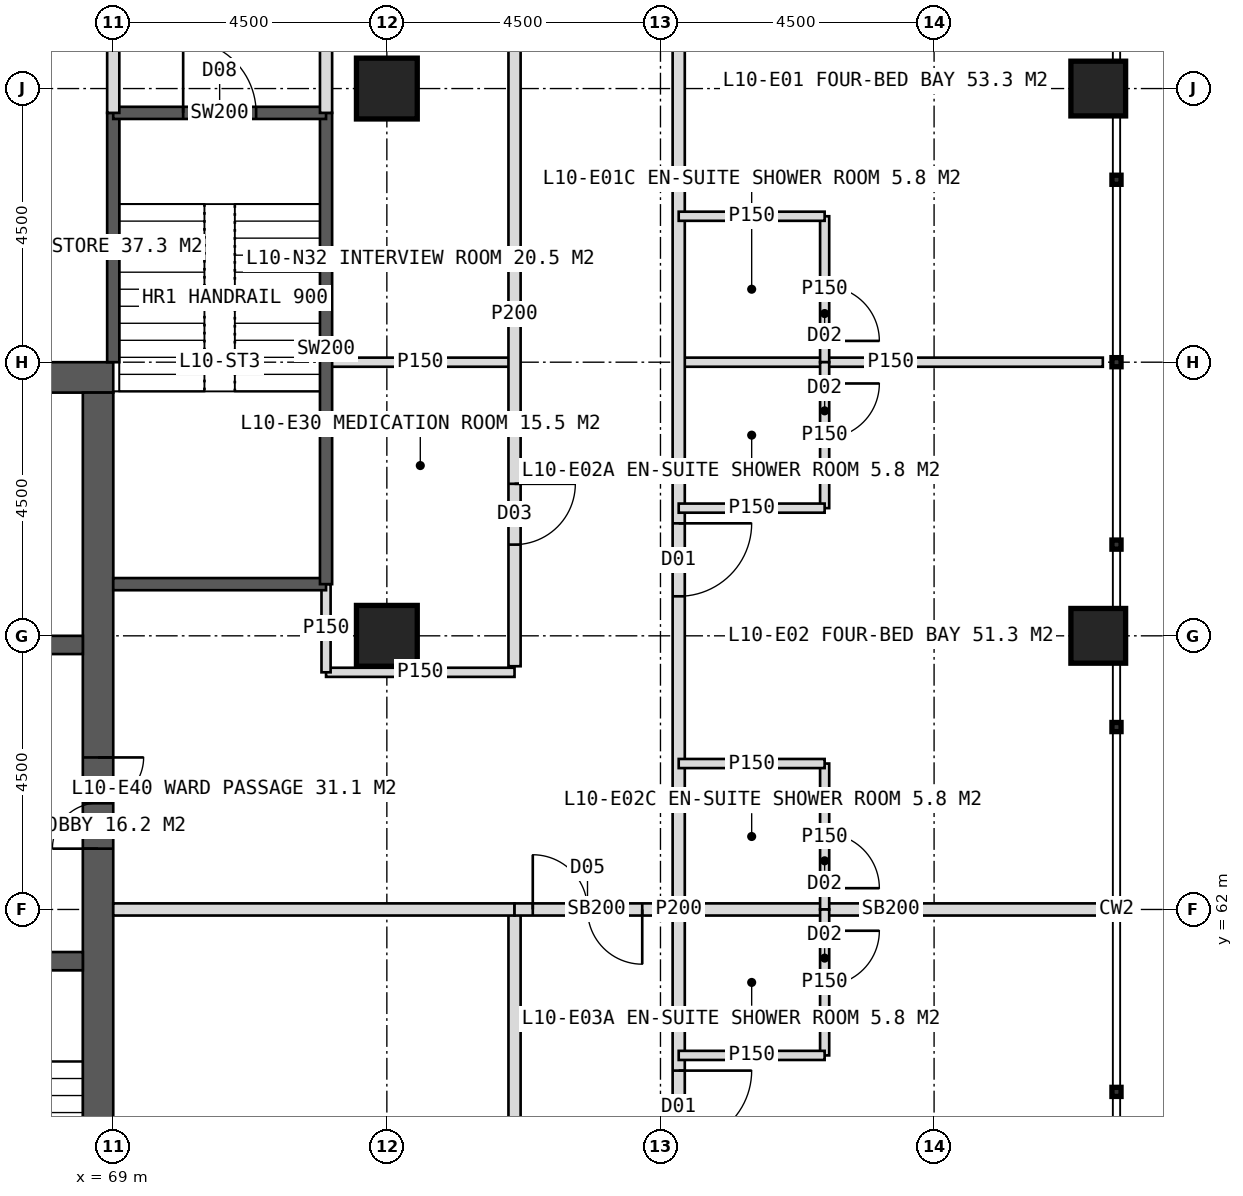
"""IFC4 building model, lengths in metres.
Left out: names, types, materials, properties, quantities, classifications, styles, units other than length and angle.
Written with IfcOpenShell. Run it as: python <this file> out.ifc"""

import sys

from ifc_helpers import new_model, si_unit, direction, frame, frame_2d, origin, origin_2d, place, context, subcontext, project, spatial, rectangle, hollow_rectangle, extrude, element, fill, save


model = new_model("IFC4")
c1 = context("Model", 3, precision=1e-05, world=origin(), true_north=direction((0.0, 1.0)))
c2 = subcontext(c1, "Body", "Model", "MODEL_VIEW")
j1 = project(units=[si_unit("LENGTHUNIT", "METRE"), si_unit("PLANEANGLEUNIT", "RADIAN")], contexts=[c1])
p1 = place(None, origin())
s1 = spatial("IfcSite", under=j1, at=p1, CompositionType="ELEMENT")
p2 = place(p1, origin())
s2 = spatial("IfcBuilding", under=s1, at=p2, CompositionType="ELEMENT")
p3 = place(p2, frame((0.0, 0.0, 47.0)))
s3 = spatial("IfcBuildingStorey", under=s2, at=p3, CompositionType="ELEMENT", Elevation=47.0)
p4 = place(p3, frame((51.0, 70.75, 0.0), z_axis=(0.0, 0.0, 1.0), x_axis=(1.0, 0.0, 0.0)))
e1 = element("IfcWall", 1, at=p4, inside=s3, PredefinedType="SHEAR", context=c2, shape_type="SweptSolid", body=[
    extrude(rectangle(XDim=18.0, YDim=0.5, at=frame_2d((9.0, 0.0))), origin(), (0.0, 0.0, 1.0), 4.0),
])
p5 = place(p4, frame((8.1, 0.0, 0.0)))
e2 = element("IfcOpeningElement", 2, at=p5, cuts=e1, PredefinedType="OPENING", context=c2, shape_type="SweptSolid", body=[
    extrude(rectangle(XDim=1.8, YDim=2.2, at=frame_2d((0.9, 1.1))), frame((0.0, 0.26, 0.0), z_axis=(0.0, -1.0, 0.0), x_axis=(1.0, 0.0, 0.0)), (0.0, 0.0, 1.0), 0.52),
])
p6 = place(p3, frame((68.75, 53.5, 0.0), z_axis=(0.0, 0.0, 1.0), x_axis=(0.0, 1.0, 0.0)))
e3 = element("IfcWall", 3, at=p6, inside=s3, PredefinedType="SHEAR", context=c2, shape_type="SweptSolid", body=[
    extrude(rectangle(XDim=17.0, YDim=0.5, at=frame_2d((8.5, 0.0))), origin(), (0.0, 0.0, 1.0), 4.0),
])
p7 = place(p6, frame((9.5, 0.0, 0.0)))
e4 = element("IfcOpeningElement", 4, at=p7, cuts=e3, PredefinedType="OPENING", context=c2, shape_type="SweptSolid", body=[
    extrude(rectangle(XDim=1.5, YDim=2.2, at=frame_2d((0.75, 1.1))), frame((0.0, 0.26, 0.0), z_axis=(0.0, -1.0, 0.0), x_axis=(1.0, 0.0, 0.0)), (0.0, 0.0, 1.0), 0.52),
])
p8 = place(p3, frame((65.2, 61.15, 0.0), z_axis=(0.0, 0.0, 1.0), x_axis=(1.0, 0.0, 0.0)))
e5 = element("IfcWall", 5, at=p8, inside=s3, PredefinedType="SHEAR", context=c2, shape_type="SweptSolid", body=[
    extrude(rectangle(XDim=3.3, YDim=0.3, at=frame_2d((1.65, 0.0))), origin(), (0.0, 0.0, 1.0), 4.0),
])
p9 = place(p8, frame((1.05, 0.0, 0.0)))
e6 = element("IfcOpeningElement", 6, at=p9, cuts=e5, PredefinedType="OPENING", context=c2, shape_type="SweptSolid", body=[
    extrude(rectangle(XDim=1.2, YDim=2.1, at=frame_2d((0.6, 1.05))), frame((0.0, 0.16, 0.0), z_axis=(0.0, -1.0, 0.0), x_axis=(1.0, 0.0, 0.0)), (0.0, 0.0, 1.0), 0.32),
])
p10 = place(p3, frame((65.2, 66.35, 0.0), z_axis=(0.0, 0.0, 1.0), x_axis=(1.0, 0.0, 0.0)))
e7 = element("IfcWall", 7, at=p10, inside=s3, PredefinedType="SHEAR", context=c2, shape_type="SweptSolid", body=[
    extrude(rectangle(XDim=3.3, YDim=0.3, at=frame_2d((1.65, 0.0))), origin(), (0.0, 0.0, 1.0), 4.0),
])
p11 = place(p10, frame((1.05, 0.0, 0.0)))
e8 = element("IfcOpeningElement", 8, at=p11, cuts=e7, PredefinedType="OPENING", context=c2, shape_type="SweptSolid", body=[
    extrude(rectangle(XDim=1.2, YDim=2.2, at=frame_2d((0.6, 1.1))), frame((0.0, 0.16, 0.0), z_axis=(0.0, -1.0, 0.0), x_axis=(1.0, 0.0, 0.0)), (0.0, 0.0, 1.0), 0.32),
])
for number, where, z_axis, x_axis in (
    (9, (73.5, 75.5, 0.0), (0.0, 0.0, 1.0), (1.0, 0.0, 0.0)),
    (10, (73.5, 66.5, 0.0), (0.0, 0.0, 1.0), (1.0, 0.0, 0.0)),
):
    element("IfcColumn", number, at=place(p3, frame(where, z_axis=z_axis, x_axis=x_axis)), inside=s3, PredefinedType="COLUMN", context=c2, shape_type="SweptSolid", body=[
        extrude(hollow_rectangle(XDim=1.0, YDim=1.0, WallThickness=0.1, at=origin_2d()), origin(), (0.0, 0.0, 1.0), 4.0),
    ])
for number, where, z_axis, x_axis in (
    (11, (85.2, 66.5, 0.0), (0.0, 0.0, 1.0), (1.0, 0.0, 0.0)),
    (12, (85.2, 75.5, 0.0), (0.0, 0.0, 1.0), (1.0, 0.0, 0.0)),
):
    element("IfcColumn", number, at=place(p3, frame(where, z_axis=z_axis, x_axis=x_axis)), inside=s3, PredefinedType="COLUMN", context=c2, shape_type="SweptSolid", body=[
        extrude(hollow_rectangle(XDim=0.9, YDim=0.9, WallThickness=0.08, at=origin_2d()), origin(), (0.0, 0.0, 1.0), 4.0),
    ])
p12 = place(p3, frame((78.3, 71.0, 0.0), z_axis=(0.0, 0.0, 1.0), x_axis=(1.0, 0.0, 0.0)))
e13 = element("IfcWall", 13, at=p12, inside=s3, PredefinedType="PARTITIONING", context=c2, shape_type="SweptSolid", body=[
    extrude(rectangle(XDim=6.975, YDim=0.15, at=frame_2d((3.487, 0.0))), origin(), (0.0, 0.0, 1.0), 3.75),
])
p13 = place(p3, frame((78.3, 62.0, 0.0), z_axis=(0.0, 0.0, 1.0), x_axis=(1.0, 0.0, 0.0)))
e14 = element("IfcWall", 14, at=p13, inside=s3, PredefinedType="SOLIDWALL", context=c2, shape_type="SweptSolid", body=[
    extrude(rectangle(XDim=6.975, YDim=0.2, at=frame_2d((3.487, 0.0))), origin(), (0.0, 0.0, 1.0), 2.75),
])
p14 = place(p3, frame((78.3, 80.3, 0.0), z_axis=(0.0, 0.0, 1.0), x_axis=(0.0, -1.0, 0.0)))
e15 = element("IfcWall", 15, at=p14, inside=s3, PredefinedType="PARTITIONING", context=c2, shape_type="SweptSolid", body=[
    extrude(rectangle(XDim=36.6, YDim=0.2, at=frame_2d((18.3, 0.0))), origin(), (0.0, 0.0, 1.0), 3.75),
])
p15 = place(p14, frame((2.65, 0.0, 0.0)))
e16 = element("IfcOpeningElement", 16, at=p15, cuts=e15, PredefinedType="OPENING", context=c2, shape_type="SweptSolid", body=[
    extrude(rectangle(XDim=1.2, YDim=2.2, at=frame_2d((0.6, 1.1))), frame((0.0, 0.11, 0.0), z_axis=(0.0, -1.0, 0.0), x_axis=(1.0, 0.0, 0.0)), (0.0, 0.0, 1.0), 0.22),
])
p16 = place(p14, frame((11.95, 0.0, 0.0)))
e17 = element("IfcOpeningElement", 17, at=p16, cuts=e15, PredefinedType="OPENING", context=c2, shape_type="SweptSolid", body=[
    extrude(rectangle(XDim=1.2, YDim=2.2, at=frame_2d((0.6, 1.1))), frame((0.0, 0.11, 0.0), z_axis=(0.0, -1.0, 0.0), x_axis=(1.0, 0.0, 0.0)), (0.0, 0.0, 1.0), 0.22),
])
p17 = place(p14, frame((20.95, 0.0, 0.0)))
e18 = element("IfcOpeningElement", 18, at=p17, cuts=e15, PredefinedType="OPENING", context=c2, shape_type="SweptSolid", body=[
    extrude(rectangle(XDim=1.2, YDim=2.2, at=frame_2d((0.6, 1.1))), frame((0.0, 0.11, 0.0), z_axis=(0.0, -1.0, 0.0), x_axis=(1.0, 0.0, 0.0)), (0.0, 0.0, 1.0), 0.22),
])
p18 = place(p14, frame((29.95, 0.0, 0.0)))
e19 = element("IfcOpeningElement", 19, at=p18, cuts=e15, PredefinedType="OPENING", context=c2, shape_type="SweptSolid", body=[
    extrude(rectangle(XDim=1.2, YDim=2.2, at=frame_2d((0.6, 1.1))), frame((0.0, 0.11, 0.0), z_axis=(0.0, -1.0, 0.0), x_axis=(1.0, 0.0, 0.0)), (0.0, 0.0, 1.0), 0.22),
])
p19 = place(p3, frame((80.7, 73.4, 0.0), z_axis=(0.0, 0.0, 1.0), x_axis=(0.0, -1.0, 0.0)))
e20 = element("IfcWall", 20, at=p19, inside=s3, PredefinedType="PARTITIONING", context=c2, shape_type="SweptSolid", body=[
    extrude(rectangle(XDim=2.4, YDim=0.15, at=frame_2d((1.2, 0.0))), origin(), (0.0, 0.0, 1.0), 3.75),
])
p20 = place(p19, frame((1.15, 0.0, 0.0)))
e21 = element("IfcOpeningElement", 21, at=p20, cuts=e20, PredefinedType="OPENING", context=c2, shape_type="SweptSolid", body=[
    extrude(rectangle(XDim=0.9, YDim=2.1, at=frame_2d((0.45, 1.05))), frame((0.0, 0.085, 0.0), z_axis=(0.0, -1.0, 0.0), x_axis=(1.0, 0.0, 0.0)), (0.0, 0.0, 1.0), 0.17),
])
p21 = place(p3, frame((78.3, 73.4, 0.0), z_axis=(0.0, 0.0, 1.0), x_axis=(1.0, 0.0, 0.0)))
e22 = element("IfcWall", 22, at=p21, inside=s3, PredefinedType="PARTITIONING", context=c2, shape_type="SweptSolid", body=[
    extrude(rectangle(XDim=2.4, YDim=0.15, at=frame_2d((1.2, 0.0))), origin(), (0.0, 0.0, 1.0), 3.75),
])
p22 = place(p3, frame((80.7, 71.0, 0.0), z_axis=(0.0, 0.0, 1.0), x_axis=(0.0, -1.0, 0.0)))
e23 = element("IfcWall", 23, at=p22, inside=s3, PredefinedType="PARTITIONING", context=c2, shape_type="SweptSolid", body=[
    extrude(rectangle(XDim=2.4, YDim=0.15, at=frame_2d((1.2, 0.0))), origin(), (0.0, 0.0, 1.0), 3.75),
])
p23 = place(p22, frame((0.35, 0.0, 0.0)))
e24 = element("IfcOpeningElement", 24, at=p23, cuts=e23, PredefinedType="OPENING", context=c2, shape_type="SweptSolid", body=[
    extrude(rectangle(XDim=0.9, YDim=2.1, at=frame_2d((0.45, 1.05))), frame((0.0, 0.085, 0.0), z_axis=(0.0, -1.0, 0.0), x_axis=(1.0, 0.0, 0.0)), (0.0, 0.0, 1.0), 0.17),
])
p24 = place(p3, frame((78.3, 68.6, 0.0), z_axis=(0.0, 0.0, 1.0), x_axis=(1.0, 0.0, 0.0)))
e25 = element("IfcWall", 25, at=p24, inside=s3, PredefinedType="PARTITIONING", context=c2, shape_type="SweptSolid", body=[
    extrude(rectangle(XDim=2.4, YDim=0.15, at=frame_2d((1.2, 0.0))), origin(), (0.0, 0.0, 1.0), 3.75),
])
p25 = place(p3, frame((80.7, 64.4, 0.0), z_axis=(0.0, 0.0, 1.0), x_axis=(0.0, -1.0, 0.0)))
e26 = element("IfcWall", 26, at=p25, inside=s3, PredefinedType="PARTITIONING", context=c2, shape_type="SweptSolid", body=[
    extrude(rectangle(XDim=2.4, YDim=0.15, at=frame_2d((1.2, 0.0))), origin(), (0.0, 0.0, 1.0), 3.75),
])
p26 = place(p25, frame((1.15, 0.0, 0.0)))
e27 = element("IfcOpeningElement", 27, at=p26, cuts=e26, PredefinedType="OPENING", context=c2, shape_type="SweptSolid", body=[
    extrude(rectangle(XDim=0.9, YDim=2.1, at=frame_2d((0.45, 1.05))), frame((0.0, 0.085, 0.0), z_axis=(0.0, -1.0, 0.0), x_axis=(1.0, 0.0, 0.0)), (0.0, 0.0, 1.0), 0.17),
])
p27 = place(p3, frame((78.3, 64.4, 0.0), z_axis=(0.0, 0.0, 1.0), x_axis=(1.0, 0.0, 0.0)))
e28 = element("IfcWall", 28, at=p27, inside=s3, PredefinedType="PARTITIONING", context=c2, shape_type="SweptSolid", body=[
    extrude(rectangle(XDim=2.4, YDim=0.15, at=frame_2d((1.2, 0.0))), origin(), (0.0, 0.0, 1.0), 3.75),
])
p28 = place(p3, frame((80.7, 62.0, 0.0), z_axis=(0.0, 0.0, 1.0), x_axis=(0.0, -1.0, 0.0)))
e29 = element("IfcWall", 29, at=p28, inside=s3, PredefinedType="PARTITIONING", context=c2, shape_type="SweptSolid", body=[
    extrude(rectangle(XDim=2.4, YDim=0.15, at=frame_2d((1.2, 0.0))), origin(), (0.0, 0.0, 1.0), 3.75),
])
p29 = place(p28, frame((0.35, 0.0, 0.0)))
e30 = element("IfcOpeningElement", 30, at=p29, cuts=e29, PredefinedType="OPENING", context=c2, shape_type="SweptSolid", body=[
    extrude(rectangle(XDim=0.9, YDim=2.1, at=frame_2d((0.45, 1.05))), frame((0.0, 0.085, 0.0), z_axis=(0.0, -1.0, 0.0), x_axis=(1.0, 0.0, 0.0)), (0.0, 0.0, 1.0), 0.17),
])
p30 = place(p3, frame((78.3, 59.6, 0.0), z_axis=(0.0, 0.0, 1.0), x_axis=(1.0, 0.0, 0.0)))
e31 = element("IfcWall", 31, at=p30, inside=s3, PredefinedType="PARTITIONING", context=c2, shape_type="SweptSolid", body=[
    extrude(rectangle(XDim=2.4, YDim=0.15, at=frame_2d((1.2, 0.0))), origin(), (0.0, 0.0, 1.0), 3.75),
])
p31 = place(p3, frame((72.5, 71.0, 0.0), z_axis=(0.0, 0.0, 1.0), x_axis=(1.0, 0.0, 0.0)))
e32 = element("IfcWall", 32, at=p31, inside=s3, PredefinedType="PARTITIONING", context=c2, shape_type="SweptSolid", body=[
    extrude(rectangle(XDim=3.1, YDim=0.15, at=frame_2d((1.55, 0.0))), origin(), (0.0, 0.0, 1.0), 3.75),
])
p32 = place(p3, frame((75.6, 77.6, 0.0), z_axis=(0.0, 0.0, 1.0), x_axis=(0.0, -1.0, 0.0)))
e33 = element("IfcWall", 33, at=p32, inside=s3, PredefinedType="PARTITIONING", context=c2, shape_type="SweptSolid", body=[
    extrude(rectangle(XDim=11.6, YDim=0.2, at=frame_2d((5.8, 0.0))), origin(), (0.0, 0.0, 1.0), 3.75),
])
p33 = place(p32, frame((8.6, 0.0, 0.0)))
e34 = element("IfcOpeningElement", 34, at=p33, cuts=e33, PredefinedType="OPENING", context=c2, shape_type="SweptSolid", body=[
    extrude(rectangle(XDim=1.0, YDim=2.1, at=frame_2d((0.5, 1.05))), frame((0.0, 0.11, 0.0), z_axis=(0.0, -1.0, 0.0), x_axis=(1.0, 0.0, 0.0)), (0.0, 0.0, 1.0), 0.22),
])
p34 = place(p3, frame((75.6, 62.0, 0.0), z_axis=(0.0, 0.0, 1.0), x_axis=(0.0, -1.0, 0.0)))
e35 = element("IfcWall", 35, at=p34, inside=s3, PredefinedType="PARTITIONING", context=c2, shape_type="SweptSolid", body=[
    extrude(rectangle(XDim=15.6, YDim=0.2, at=frame_2d((7.8, 0.0))), origin(), (0.0, 0.0, 1.0), 3.75),
])
p35 = place(p34, frame((4.0, 0.0, 0.0)))
e36 = element("IfcOpeningElement", 36, at=p35, cuts=e35, PredefinedType="OPENING", context=c2, shape_type="SweptSolid", body=[
    extrude(rectangle(XDim=1.0, YDim=2.1, at=frame_2d((0.5, 1.05))), frame((0.0, 0.11, 0.0), z_axis=(0.0, -1.0, 0.0), x_axis=(1.0, 0.0, 0.0)), (0.0, 0.0, 1.0), 0.22),
])
p36 = place(p34, frame((11.8, 0.0, 0.0)))
e37 = element("IfcOpeningElement", 37, at=p36, cuts=e35, PredefinedType="OPENING", context=c2, shape_type="SweptSolid", body=[
    extrude(rectangle(XDim=1.0, YDim=2.1, at=frame_2d((0.5, 1.05))), frame((0.0, 0.11, 0.0), z_axis=(0.0, -1.0, 0.0), x_axis=(1.0, 0.0, 0.0)), (0.0, 0.0, 1.0), 0.22),
])
p37 = place(p3, frame((72.5, 65.9, 0.0), z_axis=(0.0, 0.0, 1.0), x_axis=(1.0, 0.0, 0.0)))
e38 = element("IfcWall", 38, at=p37, inside=s3, PredefinedType="PARTITIONING", context=c2, shape_type="SweptSolid", body=[
    extrude(rectangle(XDim=3.1, YDim=0.15, at=frame_2d((1.55, 0.0))), origin(), (0.0, 0.0, 1.0), 3.75),
])
p38 = place(p3, frame((69.0, 62.0, 0.0), z_axis=(0.0, 0.0, 1.0), x_axis=(1.0, 0.0, 0.0)))
e39 = element("IfcWall", 39, at=p38, inside=s3, PredefinedType="SOLIDWALL", context=c2, shape_type="SweptSolid", body=[
    extrude(rectangle(XDim=6.6, YDim=0.2, at=frame_2d((3.3, 0.0))), origin(), (0.0, 0.0, 1.0), 2.75),
])
p39 = place(p3, frame((75.6, 62.0, 0.0), z_axis=(0.0, 0.0, 1.0), x_axis=(1.0, 0.0, 0.0)))
e40 = element("IfcWall", 40, at=p39, inside=s3, PredefinedType="SOLIDWALL", context=c2, shape_type="SweptSolid", body=[
    extrude(rectangle(XDim=2.7, YDim=0.2, at=frame_2d((1.35, 0.0))), origin(), (0.0, 0.0, 1.0), 2.75),
])
p40 = place(p39, frame((0.3, 0.0, 0.0)))
e41 = element("IfcOpeningElement", 41, at=p40, cuts=e40, PredefinedType="OPENING", context=c2, shape_type="SweptSolid", body=[
    extrude(rectangle(XDim=1.8, YDim=2.2, at=frame_2d((0.9, 1.1))), frame((0.0, 0.11, 0.0), z_axis=(0.0, -1.0, 0.0), x_axis=(1.0, 0.0, 0.0)), (0.0, 0.0, 1.0), 0.22),
])
p41 = place(p3, frame((72.5, 65.9, 0.0), z_axis=(0.0, 0.0, 1.0), x_axis=(0.0, 1.0, 0.0)))
e42 = element("IfcWall", 42, at=p41, inside=s3, PredefinedType="PARTITIONING", context=c2, shape_type="SweptSolid", body=[
    extrude(rectangle(XDim=1.45, YDim=0.15, at=frame_2d((0.725, 0.0))), origin(), (0.0, 0.0, 1.0), 3.75),
])
p42 = place(p3, frame((69.0, 71.0, 0.0), z_axis=(0.0, 0.0, 1.0), x_axis=(0.0, 1.0, 0.0)))
e43 = element("IfcWall", 43, at=p42, inside=s3, PredefinedType="SOLIDWALL", context=c2, shape_type="SweptSolid", body=[
    extrude(rectangle(XDim=4.1, YDim=0.2, at=frame_2d((2.05, 0.0))), origin(), (0.0, 0.0, 1.0), 3.75),
])
p43 = place(p3, frame((69.0, 67.35, 0.0), z_axis=(0.0, 0.0, 1.0), x_axis=(1.0, 0.0, 0.0)))
e44 = element("IfcWall", 44, at=p43, inside=s3, PredefinedType="SOLIDWALL", context=c2, shape_type="SweptSolid", body=[
    extrude(rectangle(XDim=3.5, YDim=0.2, at=frame_2d((1.75, 0.0))), origin(), (0.0, 0.0, 1.0), 3.75),
])
p44 = place(p3, frame((72.5, 67.35, 0.0), z_axis=(0.0, 0.0, 1.0), x_axis=(0.0, 1.0, 0.0)))
e45 = element("IfcWall", 45, at=p44, inside=s3, PredefinedType="SOLIDWALL", context=c2, shape_type="SweptSolid", body=[
    extrude(rectangle(XDim=7.75, YDim=0.2, at=frame_2d((3.875, 0.0))), origin(), (0.0, 0.0, 1.0), 3.75),
])
p45 = place(p3, frame((69.0, 75.1, 0.0), z_axis=(0.0, 0.0, 1.0), x_axis=(1.0, 0.0, 0.0)))
e46 = element("IfcWall", 46, at=p45, inside=s3, PredefinedType="SOLIDWALL", context=c2, shape_type="SweptSolid", body=[
    extrude(rectangle(XDim=3.5, YDim=0.2, at=frame_2d((1.75, 0.0))), origin(), (0.0, 0.0, 1.0), 3.75),
])
p46 = place(p45, frame((1.15, 0.0, 0.0)))
e47 = element("IfcOpeningElement", 47, at=p46, cuts=e46, PredefinedType="OPENING", context=c2, shape_type="SweptSolid", body=[
    extrude(rectangle(XDim=1.2, YDim=2.1, at=frame_2d((0.6, 1.05))), frame((0.0, 0.11, 0.0), z_axis=(0.0, -1.0, 0.0), x_axis=(1.0, 0.0, 0.0)), (0.0, 0.0, 1.0), 0.22),
])
for number, where, z_axis, x_axis in (
    (48, (69.0, 75.1, 0.0), (0.0, 0.0, 1.0), (0.0, 1.0, 0.0)),
    (49, (72.5, 75.1, 0.0), (0.0, 0.0, 1.0), (0.0, 1.0, 0.0)),
):
    element("IfcWall", number, at=place(p3, frame(where, z_axis=z_axis, x_axis=x_axis)), inside=s3, PredefinedType="PARTITIONING", context=c2, shape_type="SweptSolid", body=[
        extrude(rectangle(XDim=2.5, YDim=0.2, at=frame_2d((1.25, 0.0))), origin(), (0.0, 0.0, 1.0), 3.75),
    ])
p47 = place(p20, origin())
e50 = element("IfcDoor", 50, at=p47, inside=s3, OperationType="SINGLE_SWING_RIGHT", PredefinedType="DOOR", context=c2, shape_type="SweptSolid", body=[
    extrude(rectangle(XDim=0.9, YDim=2.1, at=frame_2d((0.45, 1.05))), frame((0.0, 0.025, 0.0), z_axis=(0.0, -1.0, 0.0), x_axis=(1.0, 0.0, 0.0)), (0.0, 0.0, 1.0), 0.05),
])
fill(e21, e50)
p48 = place(p16, origin())
e51 = element("IfcDoor", 51, at=p48, inside=s3, OperationType="SINGLE_SWING_LEFT", PredefinedType="DOOR", context=c2, shape_type="SweptSolid", body=[
    extrude(rectangle(XDim=1.2, YDim=2.2, at=frame_2d((0.6, 1.1))), frame((0.0, 0.025, 0.0), z_axis=(0.0, -1.0, 0.0), x_axis=(1.0, 0.0, 0.0)), (0.0, 0.0, 1.0), 0.05),
])
fill(e17, e51)
p49 = place(p23, origin())
e52 = element("IfcDoor", 52, at=p49, inside=s3, OperationType="SINGLE_SWING_LEFT", PredefinedType="DOOR", context=c2, shape_type="SweptSolid", body=[
    extrude(rectangle(XDim=0.9, YDim=2.1, at=frame_2d((0.45, 1.05))), frame((0.0, 0.025, 0.0), z_axis=(0.0, -1.0, 0.0), x_axis=(1.0, 0.0, 0.0)), (0.0, 0.0, 1.0), 0.05),
])
fill(e24, e52)
p50 = place(p26, origin())
e53 = element("IfcDoor", 53, at=p50, inside=s3, OperationType="SINGLE_SWING_RIGHT", PredefinedType="DOOR", context=c2, shape_type="SweptSolid", body=[
    extrude(rectangle(XDim=0.9, YDim=2.1, at=frame_2d((0.45, 1.05))), frame((0.0, 0.025, 0.0), z_axis=(0.0, -1.0, 0.0), x_axis=(1.0, 0.0, 0.0)), (0.0, 0.0, 1.0), 0.05),
])
fill(e27, e53)
p51 = place(p17, origin())
e54 = element("IfcDoor", 54, at=p51, inside=s3, OperationType="SINGLE_SWING_LEFT", PredefinedType="DOOR", context=c2, shape_type="SweptSolid", body=[
    extrude(rectangle(XDim=1.2, YDim=2.2, at=frame_2d((0.6, 1.1))), frame((0.0, 0.025, 0.0), z_axis=(0.0, -1.0, 0.0), x_axis=(1.0, 0.0, 0.0)), (0.0, 0.0, 1.0), 0.05),
])
fill(e18, e54)
p52 = place(p29, origin())
e55 = element("IfcDoor", 55, at=p52, inside=s3, OperationType="SINGLE_SWING_LEFT", PredefinedType="DOOR", context=c2, shape_type="SweptSolid", body=[
    extrude(rectangle(XDim=0.9, YDim=2.1, at=frame_2d((0.45, 1.05))), frame((0.0, 0.025, 0.0), z_axis=(0.0, -1.0, 0.0), x_axis=(1.0, 0.0, 0.0)), (0.0, 0.0, 1.0), 0.05),
])
fill(e30, e55)
p53 = place(p33, origin())
e56 = element("IfcDoor", 56, at=p53, inside=s3, OperationType="SINGLE_SWING_LEFT", PredefinedType="DOOR", context=c2, shape_type="SweptSolid", body=[
    extrude(rectangle(XDim=1.0, YDim=2.1, at=frame_2d((0.5, 1.05))), frame((0.0, 0.025, 0.0), z_axis=(0.0, -1.0, 0.0), x_axis=(1.0, 0.0, 0.0)), (0.0, 0.0, 1.0), 0.05),
])
fill(e34, e56)
p54 = place(p40, origin())
e57 = element("IfcDoor", 57, at=p54, inside=s3, OperationType="DOUBLE_DOOR_DOUBLE_SWING", PredefinedType="DOOR", context=c2, shape_type="SweptSolid", body=[
    extrude(rectangle(XDim=1.8, YDim=2.2, at=frame_2d((0.9, 1.1))), frame((0.0, 0.025, 0.0), z_axis=(0.0, -1.0, 0.0), x_axis=(1.0, 0.0, 0.0)), (0.0, 0.0, 1.0), 0.05),
])
fill(e41, e57)
p55 = place(p7, origin())
e58 = element("IfcDoor", 58, at=p55, inside=s3, OperationType="DOUBLE_DOOR_SINGLE_SWING", PredefinedType="DOOR", context=c2, shape_type="SweptSolid", body=[
    extrude(rectangle(XDim=1.5, YDim=2.2, at=frame_2d((0.75, 1.1))), frame((0.0, 0.025, 0.0), z_axis=(0.0, -1.0, 0.0), x_axis=(1.0, 0.0, 0.0)), (0.0, 0.0, 1.0), 0.05),
])
fill(e4, e58)
p56 = place(p46, origin())
e59 = element("IfcDoor", 59, at=p56, inside=s3, OperationType="SINGLE_SWING_LEFT", PredefinedType="DOOR", context=c2, shape_type="SweptSolid", body=[
    extrude(rectangle(XDim=1.2, YDim=2.1, at=frame_2d((0.6, 1.05))), frame((0.0, 0.025, 0.0), z_axis=(0.0, -1.0, 0.0), x_axis=(1.0, 0.0, 0.0)), (0.0, 0.0, 1.0), 0.05),
])
fill(e47, e59)
save(model, sys.argv[1])
